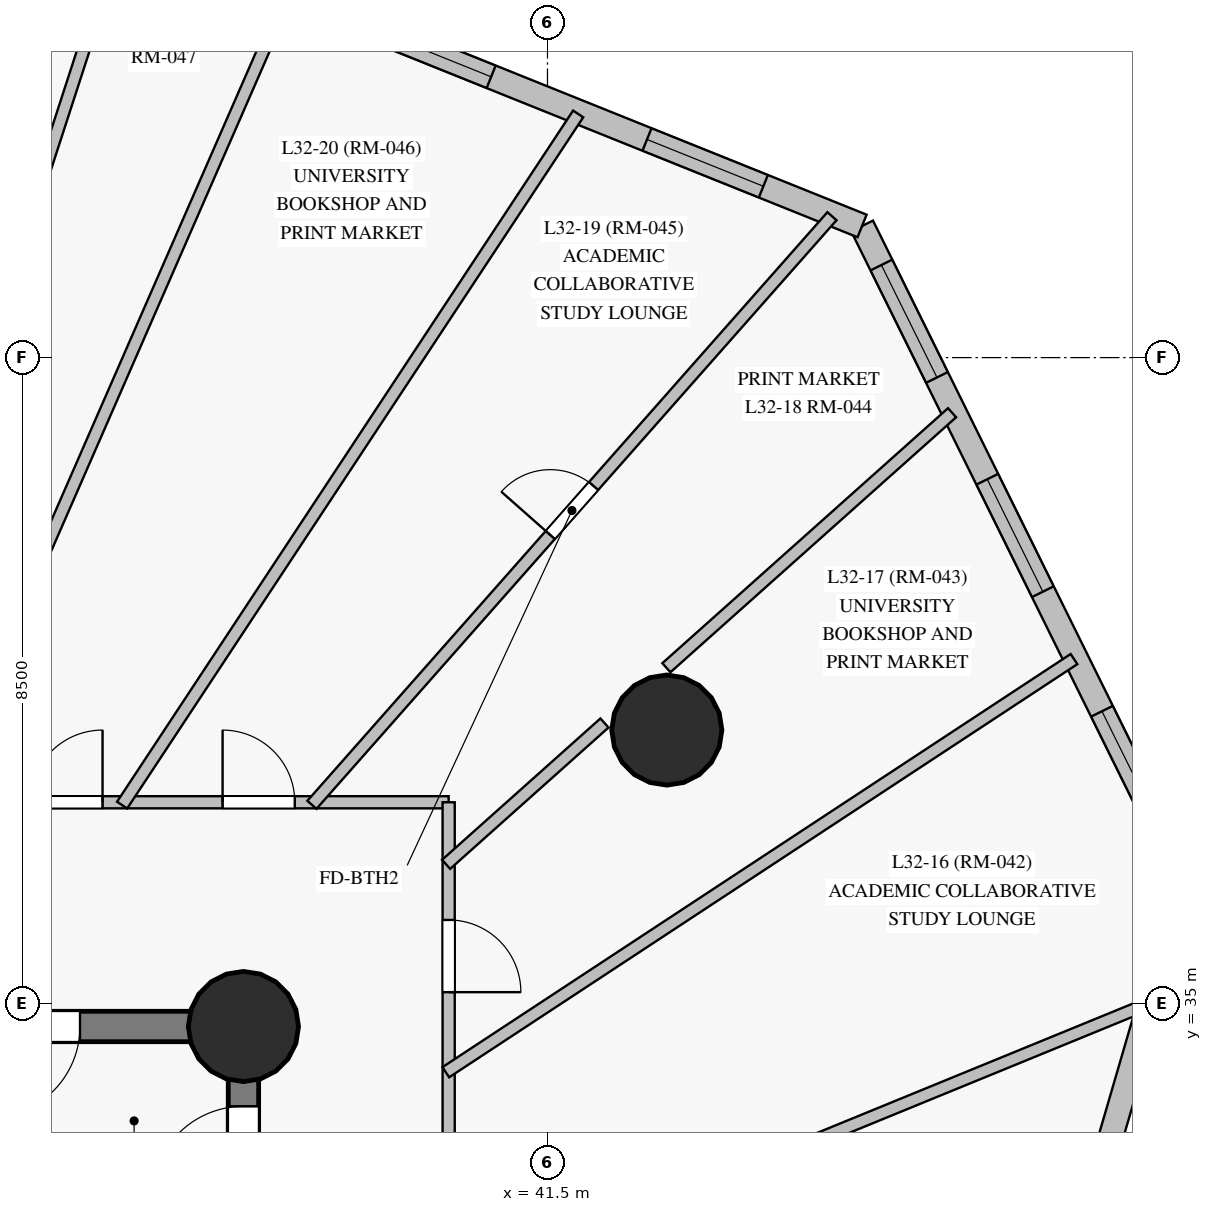
"""IFC4 building model, lengths in metres.
Left out: names, types, materials, properties, quantities, classifications, styles, units other than length and angle.
Written with IfcOpenShell. Run it as: python <this file> out.ifc"""

import sys

from ifc_helpers import new_model, si_unit, direction, frame, frame_2d, origin, origin_with_axes, origin_2d, place, context, subcontext, project, spatial, rectangle, circle, extrude, source, transform, mapped, element, fill, save


model = new_model("IFC4")
c1 = context("Model", 3, precision=1e-05, world=origin(), true_north=direction((0.0, 1.0)))
c2 = subcontext(c1, "Body", "Model", "MODEL_VIEW")
j1 = project(units=[si_unit("LENGTHUNIT", "METRE"), si_unit("PLANEANGLEUNIT", "RADIAN")], contexts=[c1])
p1 = place(None, origin())
s1 = spatial("IfcSite", under=j1, at=p1, CompositionType="ELEMENT")
p2 = place(p1, origin())
s2 = spatial("IfcBuilding", under=s1, at=p2, CompositionType="ELEMENT")
p3 = place(p2, frame((0.0, 0.0, 117.55)))
s3 = spatial("IfcBuildingStorey", under=s2, at=p3, CompositionType="ELEMENT", Elevation=117.55)
p4 = place(p3, frame((37.5, 18.3, 0.0), z_axis=(0.0, 0.0, 1.0), x_axis=(0.0, 1.0, 0.0)))
e1 = element("IfcWall", 1, at=p4, inside=s3, PredefinedType="SHEAR", context=c2, shape_type="SweptSolid", body=[
    extrude(rectangle(XDim=16.4, YDim=0.4, at=frame_2d((8.2, 0.0))), origin(), (0.0, 0.0, 1.0), 2.825),
])
p5 = place(p4, frame((14.15, 0.0, 0.0)))
e2 = element("IfcOpeningElement", 2, at=p5, cuts=e1, PredefinedType="OPENING", context=c2, shape_type="SweptSolid", body=[
    extrude(rectangle(XDim=1.2, YDim=2.15, at=frame_2d((0.6, 1.075))), frame((0.0, 0.21, 0.0), z_axis=(0.0, -1.0, 0.0), x_axis=(1.0, 0.0, 0.0)), (0.0, 0.0, 1.0), 0.42),
])
p6 = place(p3, frame((37.5, 34.7, 0.0), z_axis=(0.0, 0.0, 1.0), x_axis=(-1.0, 0.0, 0.0)))
e3 = element("IfcWall", 3, at=p6, inside=s3, PredefinedType="SHEAR", context=c2, shape_type="SweptSolid", body=[
    extrude(rectangle(XDim=10.95, YDim=0.4, at=frame_2d((5.475, 0.0))), origin(), (0.0, 0.0, 1.0), 2.825),
])
p7 = place(p6, frame((2.15, 0.0, 0.0)))
e4 = element("IfcOpeningElement", 4, at=p7, cuts=e3, PredefinedType="OPENING", context=c2, shape_type="SweptSolid", body=[
    extrude(rectangle(XDim=1.2, YDim=2.15, at=frame_2d((0.6, 1.075))), frame((0.0, 0.21, 0.0), z_axis=(0.0, -1.0, 0.0), x_axis=(1.0, 0.0, 0.0)), (0.0, 0.0, 1.0), 0.42),
])
p8 = place(p6, frame((6.35, 0.0, 0.0)))
e5 = element("IfcOpeningElement", 5, at=p8, cuts=e3, PredefinedType="OPENING", context=c2, shape_type="SweptSolid", body=[
    extrude(rectangle(XDim=1.1, YDim=2.15, at=frame_2d((0.55, 1.075))), frame((0.0, 0.21, 0.0), z_axis=(0.0, -1.0, 0.0), x_axis=(1.0, 0.0, 0.0)), (0.0, 0.0, 1.0), 0.42),
])
m1 = source(origin_with_axes(), c2, "Body", "SweptSolid", [
    extrude(circle(Radius=0.725, at=origin_2d()), origin(), (0.0, 0.0, 1.0), 3.05),
])
for number, where, z_axis, x_axis in (
    (6, (37.5, 34.7, 0.0), (0.0, 0.0, 1.0), (1.0, 0.0, 0.0)),
    (7, (43.07, 38.6, 0.0), (0.0, 0.0, 1.0), (1.0, 0.0, 0.0)),
):
    element("IfcColumn", number, at=place(p3, frame(where, z_axis=z_axis, x_axis=x_axis)), inside=s3, PredefinedType="COLUMN", context=c2, shape_type="MappedRepresentation", body=[
        mapped(m1, transform((0.0, 0.0, 0.0), scale=1.0)),
    ])
p9 = place(p3, frame((45.88, 22.851, 0.0), z_axis=(0.0, 0.0, 1.0), x_axis=(0.279941825512, 0.960016965647, 0.0)))
e8 = element("IfcWall", 8, at=p9, inside=s3, PredefinedType="SOLIDWALL", context=c2, shape_type="SweptSolid", body=[
    extrude(rectangle(XDim=14.343, YDim=0.32, at=frame_2d((7.171, 0.0))), origin(), (0.0, 0.0, 1.0), 2.825),
])
p10 = place(p9, frame((2.843, 0.0, 0.85)))
e9 = element("IfcOpeningElement", 9, at=p10, cuts=e8, PredefinedType="OPENING", context=c2, shape_type="SweptSolid", body=[
    extrude(rectangle(XDim=1.65, YDim=1.65, at=frame_2d((0.825, 0.825))), frame((0.0, 0.17, 0.0), z_axis=(0.0, -1.0, 0.0), x_axis=(1.0, 0.0, 0.0)), (0.0, 0.0, 1.0), 0.34),
])
p11 = place(p9, frame((9.076, 0.0, 0.85)))
e10 = element("IfcOpeningElement", 10, at=p11, cuts=e8, PredefinedType="OPENING", context=c2, shape_type="SweptSolid", body=[
    extrude(rectangle(XDim=1.65, YDim=1.65, at=frame_2d((0.825, 0.825))), frame((0.0, 0.17, 0.0), z_axis=(0.0, -1.0, 0.0), x_axis=(1.0, 0.0, 0.0)), (0.0, 0.0, 1.0), 0.34),
])
p12 = place(p3, frame((49.896, 36.62, 0.0), z_axis=(0.0, 0.0, 1.0), x_axis=(-0.443101896888, 0.896471253847, 0.0)))
e11 = element("IfcWall", 11, at=p12, inside=s3, PredefinedType="SOLIDWALL", context=c2, shape_type="SweptSolid", body=[
    extrude(rectangle(XDim=9.606, YDim=0.32, at=frame_2d((4.803, 0.0))), origin(), (0.0, 0.0, 1.0), 2.825),
])
p13 = place(p12, frame((0.834, 0.0, 0.85)))
e12 = element("IfcOpeningElement", 12, at=p13, cuts=e11, PredefinedType="OPENING", context=c2, shape_type="SweptSolid", body=[
    extrude(rectangle(XDim=1.65, YDim=1.65, at=frame_2d((0.825, 0.825))), frame((0.0, 0.17, 0.0), z_axis=(0.0, -1.0, 0.0), x_axis=(1.0, 0.0, 0.0)), (0.0, 0.0, 1.0), 0.34),
])
p14 = place(p12, frame((4.239, 0.0, 0.85)))
e13 = element("IfcOpeningElement", 13, at=p14, cuts=e11, PredefinedType="OPENING", context=c2, shape_type="SweptSolid", body=[
    extrude(rectangle(XDim=1.65, YDim=1.65, at=frame_2d((0.825, 0.825))), frame((0.0, 0.17, 0.0), z_axis=(0.0, -1.0, 0.0), x_axis=(1.0, 0.0, 0.0)), (0.0, 0.0, 1.0), 0.34),
])
p15 = place(p12, frame((7.383, 0.0, 0.85)))
e14 = element("IfcOpeningElement", 14, at=p15, cuts=e11, PredefinedType="OPENING", context=c2, shape_type="SweptSolid", body=[
    extrude(rectangle(XDim=1.65, YDim=1.65, at=frame_2d((0.825, 0.825))), frame((0.0, 0.17, 0.0), z_axis=(0.0, -1.0, 0.0), x_axis=(1.0, 0.0, 0.0)), (0.0, 0.0, 1.0), 0.34),
])
p16 = place(p3, frame((45.639, 45.232, 0.0), z_axis=(0.0, 0.0, 1.0), x_axis=(-0.927788462826, 0.373106644603, 0.0)))
e15 = element("IfcWall", 15, at=p16, inside=s3, PredefinedType="SOLIDWALL", context=c2, shape_type="SweptSolid", body=[
    extrude(rectangle(XDim=11.991, YDim=0.32, at=frame_2d((5.996, 0.0))), origin(), (0.0, 0.0, 1.0), 2.825),
])
p17 = place(p16, frame((1.4, 0.0, 0.85)))
e16 = element("IfcOpeningElement", 16, at=p17, cuts=e15, PredefinedType="OPENING", context=c2, shape_type="SweptSolid", body=[
    extrude(rectangle(XDim=1.65, YDim=1.65, at=frame_2d((0.825, 0.825))), frame((0.0, 0.17, 0.0), z_axis=(0.0, -1.0, 0.0), x_axis=(1.0, 0.0, 0.0)), (0.0, 0.0, 1.0), 0.34),
])
p18 = place(p16, frame((5.26, 0.0, 0.85)))
e17 = element("IfcOpeningElement", 17, at=p18, cuts=e15, PredefinedType="OPENING", context=c2, shape_type="SweptSolid", body=[
    extrude(rectangle(XDim=1.65, YDim=1.65, at=frame_2d((0.825, 0.825))), frame((0.0, 0.17, 0.0), z_axis=(0.0, -1.0, 0.0), x_axis=(1.0, 0.0, 0.0)), (0.0, 0.0, 1.0), 0.34),
])
p19 = place(p16, frame((8.613, 0.0, 0.85)))
e18 = element("IfcOpeningElement", 18, at=p19, cuts=e15, PredefinedType="OPENING", context=c2, shape_type="SweptSolid", body=[
    extrude(rectangle(XDim=1.4, YDim=1.65, at=frame_2d((0.7, 0.825))), frame((0.0, 0.17, 0.0), z_axis=(0.0, -1.0, 0.0), x_axis=(1.0, 0.0, 0.0)), (0.0, 0.0, 1.0), 0.34),
])
p20 = place(p3, frame((16.7, 37.65, 0.0), z_axis=(0.0, 0.0, 1.0), x_axis=(1.0, 0.0, 0.0)))
e19 = element("IfcWall", 19, at=p20, inside=s3, PredefinedType="PARTITIONING", context=c2, shape_type="SweptSolid", body=[
    extrude(rectangle(XDim=23.5, YDim=0.16, at=frame_2d((11.75, 0.0))), origin(), (0.0, 0.0, 1.0), 2.325),
])
p21 = place(p20, frame((20.526, 0.0, 0.0)))
e20 = element("IfcOpeningElement", 20, at=p21, cuts=e19, PredefinedType="OPENING", context=c2, shape_type="SweptSolid", body=[
    extrude(rectangle(XDim=0.95, YDim=2.15, at=frame_2d((0.475, 1.075))), frame((0.0, 0.09, 0.0), z_axis=(0.0, -1.0, 0.0), x_axis=(1.0, 0.0, 0.0)), (0.0, 0.0, 1.0), 0.18),
])
p22 = place(p20, frame((17.997, 0.0, 0.0)))
e21 = element("IfcOpeningElement", 21, at=p22, cuts=e19, PredefinedType="OPENING", context=c2, shape_type="SweptSolid", body=[
    extrude(rectangle(XDim=0.95, YDim=2.15, at=frame_2d((0.475, 1.075))), frame((0.0, 0.09, 0.0), z_axis=(0.0, -1.0, 0.0), x_axis=(1.0, 0.0, 0.0)), (0.0, 0.0, 1.0), 0.18),
])
p23 = place(p20, frame((14.26, 0.0, 0.0)))
e22 = element("IfcOpeningElement", 22, at=p23, cuts=e19, PredefinedType="OPENING", context=c2, shape_type="SweptSolid", body=[
    extrude(rectangle(XDim=0.95, YDim=2.15, at=frame_2d((0.475, 1.075))), frame((0.0, 0.09, 0.0), z_axis=(0.0, -1.0, 0.0), x_axis=(1.0, 0.0, 0.0)), (0.0, 0.0, 1.0), 0.18),
])
p24 = place(p20, frame((13.256, 0.0, 0.0)))
e23 = element("IfcOpeningElement", 23, at=p24, cuts=e19, PredefinedType="OPENING", context=c2, shape_type="SweptSolid", body=[
    extrude(rectangle(XDim=0.86, YDim=2.1, at=frame_2d((0.43, 1.05))), frame((0.0, 0.09, 0.0), z_axis=(0.0, -1.0, 0.0), x_axis=(1.0, 0.0, 0.0)), (0.0, 0.0, 1.0), 0.18),
])
p25 = place(p20, frame((11.56, 0.0, 0.0)))
e24 = element("IfcOpeningElement", 24, at=p25, cuts=e19, PredefinedType="OPENING", context=c2, shape_type="SweptSolid", body=[
    extrude(rectangle(XDim=0.95, YDim=2.15, at=frame_2d((0.475, 1.075))), frame((0.0, 0.09, 0.0), z_axis=(0.0, -1.0, 0.0), x_axis=(1.0, 0.0, 0.0)), (0.0, 0.0, 1.0), 0.18),
])
p26 = place(p20, frame((9.635, 0.0, 0.0)))
e25 = element("IfcOpeningElement", 25, at=p26, cuts=e19, PredefinedType="OPENING", context=c2, shape_type="SweptSolid", body=[
    extrude(rectangle(XDim=0.95, YDim=2.15, at=frame_2d((0.475, 1.075))), frame((0.0, 0.09, 0.0), z_axis=(0.0, -1.0, 0.0), x_axis=(1.0, 0.0, 0.0)), (0.0, 0.0, 1.0), 0.18),
])
p27 = place(p20, frame((7.922, 0.0, 0.0)))
e26 = element("IfcOpeningElement", 26, at=p27, cuts=e19, PredefinedType="OPENING", context=c2, shape_type="SweptSolid", body=[
    extrude(rectangle(XDim=0.95, YDim=2.15, at=frame_2d((0.475, 1.075))), frame((0.0, 0.09, 0.0), z_axis=(0.0, -1.0, 0.0), x_axis=(1.0, 0.0, 0.0)), (0.0, 0.0, 1.0), 0.18),
])
p28 = place(p20, frame((6.81, 0.0, 0.0)))
e27 = element("IfcOpeningElement", 27, at=p28, cuts=e19, PredefinedType="OPENING", context=c2, shape_type="SweptSolid", body=[
    extrude(rectangle(XDim=0.95, YDim=2.15, at=frame_2d((0.475, 1.075))), frame((0.0, 0.09, 0.0), z_axis=(0.0, -1.0, 0.0), x_axis=(1.0, 0.0, 0.0)), (0.0, 0.0, 1.0), 0.18),
])
p29 = place(p20, frame((2.856, 0.0, 0.0)))
e28 = element("IfcOpeningElement", 28, at=p29, cuts=e19, PredefinedType="OPENING", context=c2, shape_type="SweptSolid", body=[
    extrude(rectangle(XDim=0.95, YDim=2.15, at=frame_2d((0.475, 1.075))), frame((0.0, 0.09, 0.0), z_axis=(0.0, -1.0, 0.0), x_axis=(1.0, 0.0, 0.0)), (0.0, 0.0, 1.0), 0.18),
])
p30 = place(p3, frame((40.2, 37.65, 0.0), z_axis=(0.0, 0.0, 1.0), x_axis=(0.0, -1.0, 0.0)))
e29 = element("IfcWall", 29, at=p30, inside=s3, PredefinedType="PARTITIONING", context=c2, shape_type="SweptSolid", body=[
    extrude(rectangle(XDim=22.3, YDim=0.16, at=frame_2d((11.15, 0.0))), origin(), (0.0, 0.0, 1.0), 2.325),
])
p31 = place(p30, frame((14.02, 0.0, 0.0)))
e30 = element("IfcOpeningElement", 30, at=p31, cuts=e29, PredefinedType="OPENING", context=c2, shape_type="SweptSolid", body=[
    extrude(rectangle(XDim=0.95, YDim=2.15, at=frame_2d((0.475, 1.075))), frame((0.0, 0.09, 0.0), z_axis=(0.0, -1.0, 0.0), x_axis=(1.0, 0.0, 0.0)), (0.0, 0.0, 1.0), 0.18),
])
p32 = place(p30, frame((10.675, 0.0, 0.0)))
e31 = element("IfcOpeningElement", 31, at=p32, cuts=e29, PredefinedType="OPENING", context=c2, shape_type="SweptSolid", body=[
    extrude(rectangle(XDim=0.95, YDim=2.15, at=frame_2d((0.475, 1.075))), frame((0.0, 0.09, 0.0), z_axis=(0.0, -1.0, 0.0), x_axis=(1.0, 0.0, 0.0)), (0.0, 0.0, 1.0), 0.18),
])
p33 = place(p30, frame((7.33, 0.0, 0.0)))
e32 = element("IfcOpeningElement", 32, at=p33, cuts=e29, PredefinedType="OPENING", context=c2, shape_type="SweptSolid", body=[
    extrude(rectangle(XDim=0.95, YDim=2.15, at=frame_2d((0.475, 1.075))), frame((0.0, 0.09, 0.0), z_axis=(0.0, -1.0, 0.0), x_axis=(1.0, 0.0, 0.0)), (0.0, 0.0, 1.0), 0.18),
])
p34 = place(p30, frame((5.1, 0.0, 0.0)))
e33 = element("IfcOpeningElement", 33, at=p34, cuts=e29, PredefinedType="OPENING", context=c2, shape_type="SweptSolid", body=[
    extrude(rectangle(XDim=0.95, YDim=2.15, at=frame_2d((0.475, 1.075))), frame((0.0, 0.09, 0.0), z_axis=(0.0, -1.0, 0.0), x_axis=(1.0, 0.0, 0.0)), (0.0, 0.0, 1.0), 0.18),
])
p35 = place(p30, frame((1.548, 0.0, 0.0)))
e34 = element("IfcOpeningElement", 34, at=p35, cuts=e29, PredefinedType="OPENING", context=c2, shape_type="SweptSolid", body=[
    extrude(rectangle(XDim=0.95, YDim=2.15, at=frame_2d((0.475, 1.075))), frame((0.0, 0.09, 0.0), z_axis=(0.0, -1.0, 0.0), x_axis=(1.0, 0.0, 0.0)), (0.0, 0.0, 1.0), 0.18),
])
p36 = place(p3, frame((32.174, 37.622, 0.0), z_axis=(0.0, 0.0, 1.0), x_axis=(0.30877139815, 0.95113628029, 0.0)))
e35 = element("IfcWall", 35, at=p36, inside=s3, PredefinedType="PARTITIONING", context=c2, shape_type="SweptSolid", body=[
    extrude(rectangle(XDim=12.088, YDim=0.16, at=frame_2d((6.044, 0.0))), origin(), (0.0, 0.0, 1.0), 2.825),
])
p37 = place(p36, frame((5.614, 0.0, 0.0)))
e36 = element("IfcOpeningElement", 36, at=p37, cuts=e35, PredefinedType="OPENING", context=c2, shape_type="SweptSolid", body=[
    extrude(rectangle(XDim=0.86, YDim=2.04, at=frame_2d((0.43, 1.02))), frame((0.0, 0.09, 0.0), z_axis=(0.0, -1.0, 0.0), x_axis=(1.0, 0.0, 0.0)), (0.0, 0.0, 1.0), 0.18),
])
p38 = place(p3, frame((33.427, 37.623, 0.0), z_axis=(0.0, 0.0, 1.0), x_axis=(0.400520613266, 0.916287748663, 0.0)))
e37 = element("IfcWall", 37, at=p38, inside=s3, PredefinedType="PARTITIONING", context=c2, shape_type="SweptSolid", body=[
    extrude(rectangle(XDim=11.596, YDim=0.16, at=frame_2d((5.798, 0.0))), origin(), (0.0, 0.0, 1.0), 2.825),
])
p39 = place(p3, frame((35.904, 37.613, 0.0), z_axis=(0.0, 0.0, 1.0), x_axis=(0.550742924519, 0.8346749254, 0.0)))
e38 = element("IfcWall", 38, at=p39, inside=s3, PredefinedType="PARTITIONING", context=c2, shape_type="SweptSolid", body=[
    extrude(rectangle(XDim=10.894, YDim=0.16, at=frame_2d((5.447, 0.0))), origin(), (0.0, 0.0, 1.0), 2.825),
])
p40 = place(p3, frame((38.401, 37.616, 0.0), z_axis=(0.0, 0.0, 1.0), x_axis=(0.662096599454, 0.749418503236, 0.0)))
e39 = element("IfcWall", 39, at=p40, inside=s3, PredefinedType="PARTITIONING", context=c2, shape_type="SweptSolid", body=[
    extrude(rectangle(XDim=10.333, YDim=0.16, at=frame_2d((5.167, 0.0))), origin(), (0.0, 0.0, 1.0), 2.825),
])
p41 = place(p40, frame((4.737, 0.0, 0.0)))
e40 = element("IfcOpeningElement", 40, at=p41, cuts=e39, PredefinedType="OPENING", context=c2, shape_type="SweptSolid", body=[
    extrude(rectangle(XDim=0.86, YDim=2.04, at=frame_2d((0.43, 1.02))), frame((0.0, 0.09, 0.0), z_axis=(0.0, -1.0, 0.0), x_axis=(1.0, 0.0, 0.0)), (0.0, 0.0, 1.0), 0.18),
])
p42 = place(p3, frame((40.172, 31.217, 0.0), z_axis=(0.0, 0.0, 1.0), x_axis=(0.925368222218, 0.379069457103, 0.0)))
e41 = element("IfcWall", 41, at=p42, inside=s3, PredefinedType="PARTITIONING", context=c2, shape_type="SweptSolid", body=[
    extrude(rectangle(XDim=9.949, YDim=0.16, at=frame_2d((4.975, 0.0))), origin(), (0.0, 0.0, 1.0), 2.825),
])
p43 = place(p3, frame((40.162, 34.098, 0.0), z_axis=(0.0, 0.0, 1.0), x_axis=(0.835508327982, 0.549477782874, 0.0)))
e42 = element("IfcWall", 42, at=p43, inside=s3, PredefinedType="PARTITIONING", context=c2, shape_type="SweptSolid", body=[
    extrude(rectangle(XDim=9.892, YDim=0.16, at=frame_2d((4.946, 0.0))), origin(), (0.0, 0.0, 1.0), 2.825),
])
p44 = place(p3, frame((43.064, 39.42, 0.0), z_axis=(0.0, 0.0, 1.0), x_axis=(0.746022776511, 0.665920428374, 0.0)))
e43 = element("IfcWall", 43, at=p44, inside=s3, PredefinedType="PARTITIONING", context=c2, shape_type="SweptSolid", body=[
    extrude(rectangle(XDim=5.038, YDim=0.16, at=frame_2d((2.519, 0.0))), origin(), (0.0, 0.0, 1.0), 2.825),
])
p45 = place(p3, frame((40.167, 36.833, 0.0), z_axis=(0.0, 0.0, 1.0), x_axis=(0.746009004767, 0.665935856376, 0.0)))
e44 = element("IfcWall", 44, at=p45, inside=s3, PredefinedType="PARTITIONING", context=c2, shape_type="SweptSolid", body=[
    extrude(rectangle(XDim=2.793, YDim=0.16, at=frame_2d((1.396, 0.0))), origin(), (0.0, 0.0, 1.0), 2.225),
])
m2 = source(origin_with_axes(), c2, "Body", "SweptSolid", [
    extrude(rectangle(XDim=1.65, YDim=1.65, at=frame_2d((0.825, 0.825))), frame((0.0, 0.03, 0.0), z_axis=(0.0, -1.0, 0.0), x_axis=(1.0, 0.0, 0.0)), (0.0, 0.0, 1.0), 0.06),
])
p46 = place(p13, origin())
e45 = element("IfcWindow", 45, at=p46, inside=s3, PartitioningType="SINGLE_PANEL", PredefinedType="WINDOW", context=c2, shape_type="MappedRepresentation", body=[
    mapped(m2, transform((0.0, 0.0, 0.0), scale=1.0)),
])
fill(e12, e45)
p47 = place(p14, origin())
e46 = element("IfcWindow", 46, at=p47, inside=s3, PartitioningType="SINGLE_PANEL", PredefinedType="WINDOW", context=c2, shape_type="MappedRepresentation", body=[
    mapped(m2, transform((0.0, 0.0, 0.0), scale=1.0)),
])
fill(e13, e46)
p48 = place(p15, origin())
e47 = element("IfcWindow", 47, at=p48, inside=s3, PartitioningType="SINGLE_PANEL", PredefinedType="WINDOW", context=c2, shape_type="MappedRepresentation", body=[
    mapped(m2, transform((0.0, 0.0, 0.0), scale=1.0)),
])
fill(e14, e47)
p49 = place(p17, origin())
e48 = element("IfcWindow", 48, at=p49, inside=s3, PartitioningType="SINGLE_PANEL", PredefinedType="WINDOW", context=c2, shape_type="MappedRepresentation", body=[
    mapped(m2, transform((0.0, 0.0, 0.0), scale=1.0)),
])
fill(e16, e48)
p50 = place(p18, origin())
e49 = element("IfcWindow", 49, at=p50, inside=s3, PartitioningType="SINGLE_PANEL", PredefinedType="WINDOW", context=c2, shape_type="MappedRepresentation", body=[
    mapped(m2, transform((0.0, 0.0, 0.0), scale=1.0)),
])
fill(e17, e49)
m3 = source(origin_with_axes(), c2, "Body", "SweptSolid", [
    extrude(rectangle(XDim=1.2, YDim=2.15, at=frame_2d((0.6, 1.075))), frame((0.0, 0.025, 0.0), z_axis=(0.0, -1.0, 0.0), x_axis=(1.0, 0.0, 0.0)), (0.0, 0.0, 1.0), 0.05),
])
p51 = place(p5, origin())
e50 = element("IfcDoor", 50, at=p51, inside=s3, OperationType="SINGLE_SWING_LEFT", PredefinedType="DOOR", context=c2, shape_type="MappedRepresentation", body=[
    mapped(m3, transform((0.0, 0.0, 0.0), scale=1.0)),
])
fill(e2, e50)
p52 = place(p7, origin())
e51 = element("IfcDoor", 51, at=p52, inside=s3, OperationType="SINGLE_SWING_RIGHT", PredefinedType="DOOR", context=c2, shape_type="MappedRepresentation", body=[
    mapped(m3, transform((0.0, 0.0, 0.0), scale=1.0)),
])
fill(e4, e51)
m4 = source(origin_with_axes(), c2, "Body", "SweptSolid", [
    extrude(rectangle(XDim=0.95, YDim=2.15, at=frame_2d((0.475, 1.075))), frame((0.0, 0.025, 0.0), z_axis=(0.0, -1.0, 0.0), x_axis=(1.0, 0.0, 0.0)), (0.0, 0.0, 1.0), 0.05),
])
p53 = place(p35, origin())
e52 = element("IfcDoor", 52, at=p53, inside=s3, OperationType="SINGLE_SWING_RIGHT", PredefinedType="DOOR", context=c2, shape_type="MappedRepresentation", body=[
    mapped(m4, transform((0.0, 0.0, 0.0), scale=1.0)),
])
fill(e34, e52)
p54 = place(p21, origin())
e53 = element("IfcDoor", 53, at=p54, inside=s3, OperationType="SINGLE_SWING_LEFT", PredefinedType="DOOR", context=c2, shape_type="MappedRepresentation", body=[
    mapped(m4, transform((0.0, 0.0, 0.0), scale=1.0)),
])
fill(e20, e53)
p55 = place(p22, origin())
e54 = element("IfcDoor", 54, at=p55, inside=s3, OperationType="SINGLE_SWING_RIGHT", PredefinedType="DOOR", context=c2, shape_type="MappedRepresentation", body=[
    mapped(m4, transform((0.0, 0.0, 0.0), scale=1.0)),
])
fill(e21, e54)
m5 = source(origin_with_axes(), c2, "Body", "SweptSolid", [
    extrude(rectangle(XDim=0.86, YDim=2.04, at=frame_2d((0.43, 1.02))), frame((0.0, 0.025, 0.0), z_axis=(0.0, -1.0, 0.0), x_axis=(1.0, 0.0, 0.0)), (0.0, 0.0, 1.0), 0.05),
])
p56 = place(p41, origin())
e55 = element("IfcDoor", 55, at=p56, inside=s3, OperationType="SINGLE_SWING_LEFT", PredefinedType="DOOR", context=c2, shape_type="MappedRepresentation", body=[
    mapped(m5, transform((0.0, 0.0, 0.0), scale=1.0)),
])
fill(e40, e55)
save(model, sys.argv[1])
